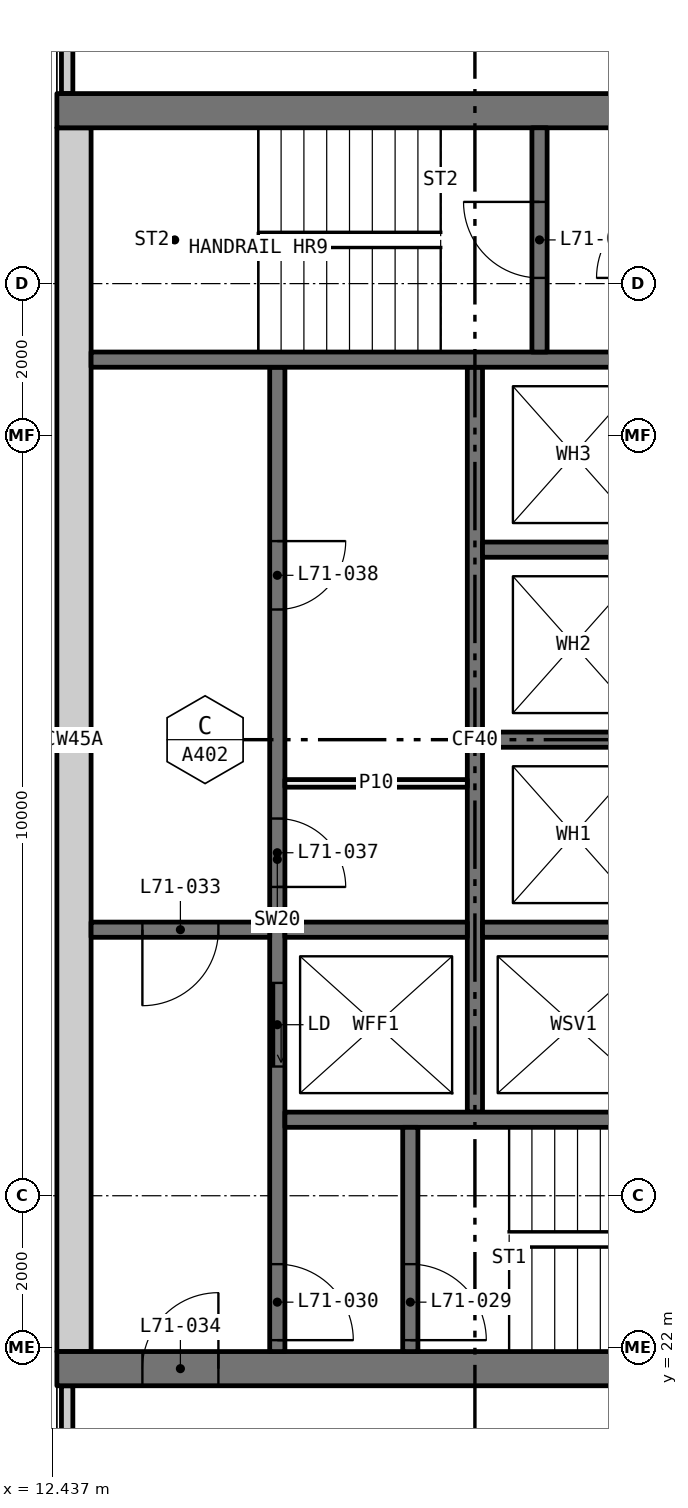
"""IFC4 building model, lengths in metres.
Left out: names, types, materials, properties, quantities, classifications, styles, units other than length and angle.
Written with IfcOpenShell. Run it as: python <this file> out.ifc"""

import sys

from ifc_helpers import new_model, si_unit, direction, frame, frame_2d, origin, place, context, subcontext, project, spatial, rectangle, extrude, element, fill, save


model = new_model("IFC4")
c1 = context("Model", 3, precision=1e-05, world=origin(), true_north=direction((0.0, 1.0)))
c2 = subcontext(c1, "Body", "Model", "MODEL_VIEW")
j1 = project(units=[si_unit("LENGTHUNIT", "METRE"), si_unit("PLANEANGLEUNIT", "RADIAN")], contexts=[c1])
p1 = place(None, origin())
s1 = spatial("IfcSite", under=j1, at=p1, CompositionType="ELEMENT")
p2 = place(p1, origin())
s2 = spatial("IfcBuilding", under=s1, at=p2, CompositionType="ELEMENT")
p3 = place(p2, frame((0.0, 0.0, 262.8)))
s3 = spatial("IfcBuildingStorey", under=s2, at=p3, CompositionType="ELEMENT", Elevation=262.8)
for number, where, z_axis, x_axis in (
    (1, (12.635, 18.71, 0.0), (0.0, 0.0, 1.0), (0.0, 1.0, 0.0)),
    (2, (12.635, 38.5, 0.0), (0.0, 0.0, 1.0), (0.0, 1.0, 0.0)),
):
    element("IfcWall", number, at=place(p3, frame(where, z_axis=z_axis, x_axis=x_axis)), inside=s3, PredefinedType="ELEMENTEDWALL", context=c2, shape_type="SweptSolid", body=[
        extrude(rectangle(XDim=2.79, YDim=0.15, at=frame_2d((1.395, 0.0))), origin(), (0.0, 0.0, 1.0), 3.05),
    ])
p4 = place(p3, frame((12.5, 21.725, 0.0), z_axis=(0.0, 0.0, 1.0), x_axis=(1.0, 0.0, 0.0)))
e3 = element("IfcWall", 3, at=p4, inside=s3, PredefinedType="SHEAR", context=c2, shape_type="SweptSolid", body=[
    extrude(rectangle(XDim=11.0, YDim=0.45, at=frame_2d((5.5, 0.0))), origin(), (0.0, 0.0, 1.0), 3.05),
])
p5 = place(p4, frame((1.125, 0.0, 0.0)))
e4 = element("IfcOpeningElement", 4, at=p5, cuts=e3, PredefinedType="OPENING", context=c2, shape_type="SweptSolid", body=[
    extrude(rectangle(XDim=1.0, YDim=2.1, at=frame_2d((0.5, 1.05))), frame((0.0, 0.235, 0.0), z_axis=(0.0, -1.0, 0.0), x_axis=(1.0, 0.0, 0.0)), (0.0, 0.0, 1.0), 0.47),
])
p6 = place(p3, frame((12.5, 38.275, 0.0), z_axis=(0.0, 0.0, 1.0), x_axis=(1.0, 0.0, 0.0)))
e5 = element("IfcWall", 5, at=p6, inside=s3, PredefinedType="SHEAR", context=c2, shape_type="SweptSolid", body=[
    extrude(rectangle(XDim=11.0, YDim=0.45, at=frame_2d((5.5, 0.0))), origin(), (0.0, 0.0, 1.0), 3.05),
])
p7 = place(p6, frame((8.575, 0.0, 0.0)))
e6 = element("IfcOpeningElement", 6, at=p7, cuts=e5, PredefinedType="OPENING", context=c2, shape_type="SweptSolid", body=[
    extrude(rectangle(XDim=1.6, YDim=2.1, at=frame_2d((0.8, 1.05))), frame((0.0, 0.235, 0.0), z_axis=(0.0, -1.0, 0.0), x_axis=(1.0, 0.0, 0.0)), (0.0, 0.0, 1.0), 0.47),
])
p8 = place(p3, frame((12.725, 21.95, 0.0), z_axis=(0.0, 0.0, 1.0), x_axis=(0.0, 1.0, 0.0)))
e7 = element("IfcWall", 7, at=p8, inside=s3, PredefinedType="SHEAR", context=c2, shape_type="SweptSolid", body=[
    extrude(rectangle(XDim=16.1, YDim=0.45, at=frame_2d((8.05, 0.0))), origin(), (0.0, 0.0, 1.0), 3.05),
])
p9 = place(p3, frame((15.4, 21.95, 0.0), z_axis=(0.0, 0.0, 1.0), x_axis=(0.0, 1.0, 0.0)))
e8 = element("IfcWall", 8, at=p9, inside=s3, PredefinedType="SOLIDWALL", context=c2, shape_type="SweptSolid", body=[
    extrude(rectangle(XDim=12.95, YDim=0.2, at=frame_2d((6.475, 0.0))), origin(), (0.0, 0.0, 1.0), 3.05),
])
p10 = place(p9, frame((3.75, 0.0, 0.0)))
e9 = element("IfcOpeningElement", 9, at=p10, cuts=e8, PredefinedType="OPENING", context=c2, shape_type="SweptSolid", body=[
    extrude(rectangle(XDim=1.1, YDim=2.1, at=frame_2d((0.55, 1.05))), frame((0.0, 0.11, 0.0), z_axis=(0.0, -1.0, 0.0), x_axis=(1.0, 0.0, 0.0)), (0.0, 0.0, 1.0), 0.22),
])
p11 = place(p9, frame((0.15, 0.0, 0.0)))
e10 = element("IfcOpeningElement", 10, at=p11, cuts=e8, PredefinedType="OPENING", context=c2, shape_type="SweptSolid", body=[
    extrude(rectangle(XDim=1.0, YDim=2.1, at=frame_2d((0.5, 1.05))), frame((0.0, 0.11, 0.0), z_axis=(0.0, -1.0, 0.0), x_axis=(1.0, 0.0, 0.0)), (0.0, 0.0, 1.0), 0.22),
])
p12 = place(p9, frame((6.113, 0.0, 0.0)))
e11 = element("IfcOpeningElement", 11, at=p12, cuts=e8, PredefinedType="OPENING", context=c2, shape_type="SweptSolid", body=[
    extrude(rectangle(XDim=0.9, YDim=2.1, at=frame_2d((0.45, 1.05))), frame((0.0, 0.11, 0.0), z_axis=(0.0, -1.0, 0.0), x_axis=(1.0, 0.0, 0.0)), (0.0, 0.0, 1.0), 0.22),
])
p13 = place(p9, frame((9.762, 0.0, 0.0)))
e12 = element("IfcOpeningElement", 12, at=p13, cuts=e8, PredefinedType="OPENING", context=c2, shape_type="SweptSolid", body=[
    extrude(rectangle(XDim=0.9, YDim=2.1, at=frame_2d((0.45, 1.05))), frame((0.0, 0.11, 0.0), z_axis=(0.0, -1.0, 0.0), x_axis=(1.0, 0.0, 0.0)), (0.0, 0.0, 1.0), 0.22),
])
p14 = place(p3, frame((18.0, 25.1, 0.0), z_axis=(0.0, 0.0, 1.0), x_axis=(0.0, 1.0, 0.0)))
e13 = element("IfcWall", 13, at=p14, inside=s3, PredefinedType="SOLIDWALL", context=c2, shape_type="SweptSolid", body=[
    extrude(rectangle(XDim=9.8, YDim=0.2, at=frame_2d((4.9, 0.0))), origin(), (0.0, 0.0, 1.0), 3.05),
])
for number, where, z_axis, x_axis in (
    (14, (15.5, 25.0, 0.0), (0.0, 0.0, 1.0), (1.0, 0.0, 0.0)),
    (15, (12.95, 35.0, 0.0), (0.0, 0.0, 1.0), (1.0, 0.0, 0.0)),
):
    element("IfcWall", number, at=place(p3, frame(where, z_axis=z_axis, x_axis=x_axis)), inside=s3, PredefinedType="SOLIDWALL", context=c2, shape_type="SweptSolid", body=[
        extrude(rectangle(XDim=7.55, YDim=0.2, at=frame_2d((3.775, 0.0))), origin(), (0.0, 0.0, 1.0), 3.05),
    ])
p15 = place(p3, frame((12.95, 27.5, 0.0), z_axis=(0.0, 0.0, 1.0), x_axis=(1.0, 0.0, 0.0)))
e16 = element("IfcWall", 16, at=p15, inside=s3, PredefinedType="SOLIDWALL", context=c2, shape_type="SweptSolid", body=[
    extrude(rectangle(XDim=2.35, YDim=0.2, at=frame_2d((1.175, 0.0))), origin(), (0.0, 0.0, 1.0), 3.05),
])
p16 = place(p15, frame((0.675, 0.0, 0.0)))
e17 = element("IfcOpeningElement", 17, at=p16, cuts=e16, PredefinedType="OPENING", context=c2, shape_type="SweptSolid", body=[
    extrude(rectangle(XDim=1.0, YDim=2.1, at=frame_2d((0.5, 1.05))), frame((0.0, 0.11, 0.0), z_axis=(0.0, -1.0, 0.0), x_axis=(1.0, 0.0, 0.0)), (0.0, 0.0, 1.0), 0.22),
])
p17 = place(p3, frame((17.15, 21.95, 0.0), z_axis=(0.0, 0.0, 1.0), x_axis=(0.0, 1.0, 0.0)))
e18 = element("IfcWall", 18, at=p17, inside=s3, PredefinedType="SOLIDWALL", context=c2, shape_type="SweptSolid", body=[
    extrude(rectangle(XDim=2.95, YDim=0.2, at=frame_2d((1.475, 0.0))), origin(), (0.0, 0.0, 1.0), 3.05),
])
p18 = place(p17, frame((0.15, 0.0, 0.0)))
e19 = element("IfcOpeningElement", 19, at=p18, cuts=e18, PredefinedType="OPENING", context=c2, shape_type="SweptSolid", body=[
    extrude(rectangle(XDim=1.0, YDim=2.1, at=frame_2d((0.5, 1.05))), frame((0.0, 0.11, 0.0), z_axis=(0.0, -1.0, 0.0), x_axis=(1.0, 0.0, 0.0)), (0.0, 0.0, 1.0), 0.22),
])
p19 = place(p3, frame((18.85, 35.1, 0.0), z_axis=(0.0, 0.0, 1.0), x_axis=(0.0, 1.0, 0.0)))
e20 = element("IfcWall", 20, at=p19, inside=s3, PredefinedType="SOLIDWALL", context=c2, shape_type="SweptSolid", body=[
    extrude(rectangle(XDim=2.95, YDim=0.2, at=frame_2d((1.475, 0.0))), origin(), (0.0, 0.0, 1.0), 3.05),
])
p20 = place(p19, frame((0.975, 0.0, 0.0)))
e21 = element("IfcOpeningElement", 21, at=p20, cuts=e20, PredefinedType="OPENING", context=c2, shape_type="SweptSolid", body=[
    extrude(rectangle(XDim=1.0, YDim=2.1, at=frame_2d((0.5, 1.05))), frame((0.0, 0.11, 0.0), z_axis=(0.0, -1.0, 0.0), x_axis=(1.0, 0.0, 0.0)), (0.0, 0.0, 1.0), 0.22),
])
for number, where, z_axis, x_axis in (
    (22, (15.5, 27.5, 0.0), (0.0, 0.0, 1.0), (1.0, 0.0, 0.0)),
    (23, (18.1, 27.5, 0.0), (0.0, 0.0, 1.0), (1.0, 0.0, 0.0)),
    (24, (18.1, 30.0, 0.0), (0.0, 0.0, 1.0), (1.0, 0.0, 0.0)),
    (25, (18.1, 32.5, 0.0), (0.0, 0.0, 1.0), (1.0, 0.0, 0.0)),
):
    element("IfcWall", number, at=place(p3, frame(where, z_axis=z_axis, x_axis=x_axis)), inside=s3, PredefinedType="SOLIDWALL", context=c2, shape_type="SweptSolid", body=[
        extrude(rectangle(XDim=2.4, YDim=0.2, at=frame_2d((1.2, 0.0))), origin(), (0.0, 0.0, 1.0), 3.05),
    ])
p21 = place(p3, frame((15.5, 29.425, 0.0), z_axis=(0.0, 0.0, 1.0), x_axis=(1.0, 0.0, 0.0)))
e26 = element("IfcWall", 26, at=p21, inside=s3, PredefinedType="PARTITIONING", context=c2, shape_type="SweptSolid", body=[
    extrude(rectangle(XDim=2.4, YDim=0.1, at=frame_2d((1.2, 0.0))), origin(), (0.0, 0.0, 1.0), 3.05),
])
p22 = place(p10, origin())
e27 = element("IfcDoor", 27, at=p22, inside=s3, OperationType="SLIDING_TO_LEFT", PredefinedType="DOOR", context=c2, shape_type="SweptSolid", body=[
    extrude(rectangle(XDim=1.1, YDim=2.1, at=frame_2d((0.55, 1.05))), frame((0.0, 0.025, 0.0), z_axis=(0.0, -1.0, 0.0), x_axis=(1.0, 0.0, 0.0)), (0.0, 0.0, 1.0), 0.05),
])
fill(e9, e27)
p23 = place(p18, frame((1.0, 0.0, 0.0), x_axis=(-1.0, 0.0, 0.0)))
e28 = element("IfcDoor", 28, at=p23, inside=s3, OperationType="SINGLE_SWING_LEFT", PredefinedType="DOOR", context=c2, shape_type="SweptSolid", body=[
    extrude(rectangle(XDim=1.0, YDim=2.1, at=frame_2d((0.5, 1.05))), frame((0.0, 0.025, 0.0), z_axis=(0.0, -1.0, 0.0), x_axis=(1.0, 0.0, 0.0)), (0.0, 0.0, 1.0), 0.05),
])
fill(e19, e28)
p24 = place(p11, frame((1.0, 0.0, 0.0), x_axis=(-1.0, 0.0, 0.0)))
e29 = element("IfcDoor", 29, at=p24, inside=s3, OperationType="SINGLE_SWING_LEFT", PredefinedType="DOOR", context=c2, shape_type="SweptSolid", body=[
    extrude(rectangle(XDim=1.0, YDim=2.1, at=frame_2d((0.5, 1.05))), frame((0.0, 0.025, 0.0), z_axis=(0.0, -1.0, 0.0), x_axis=(1.0, 0.0, 0.0)), (0.0, 0.0, 1.0), 0.05),
])
fill(e10, e29)
p25 = place(p20, origin())
e30 = element("IfcDoor", 30, at=p25, inside=s3, OperationType="SINGLE_SWING_LEFT", PredefinedType="DOOR", context=c2, shape_type="SweptSolid", body=[
    extrude(rectangle(XDim=1.0, YDim=2.1, at=frame_2d((0.5, 1.05))), frame((0.0, 0.025, 0.0), z_axis=(0.0, -1.0, 0.0), x_axis=(1.0, 0.0, 0.0)), (0.0, 0.0, 1.0), 0.05),
])
fill(e21, e30)
p26 = place(p16, frame((1.0, 0.0, 0.0), x_axis=(-1.0, 0.0, 0.0)))
e31 = element("IfcDoor", 31, at=p26, inside=s3, OperationType="SINGLE_SWING_LEFT", PredefinedType="DOOR", context=c2, shape_type="SweptSolid", body=[
    extrude(rectangle(XDim=1.0, YDim=2.1, at=frame_2d((0.5, 1.05))), frame((0.0, 0.025, 0.0), z_axis=(0.0, -1.0, 0.0), x_axis=(1.0, 0.0, 0.0)), (0.0, 0.0, 1.0), 0.05),
])
fill(e17, e31)
p27 = place(p5, origin())
e32 = element("IfcDoor", 32, at=p27, inside=s3, OperationType="SINGLE_SWING_LEFT", PredefinedType="DOOR", context=c2, shape_type="SweptSolid", body=[
    extrude(rectangle(XDim=1.0, YDim=2.1, at=frame_2d((0.5, 1.05))), frame((0.0, 0.025, 0.0), z_axis=(0.0, -1.0, 0.0), x_axis=(1.0, 0.0, 0.0)), (0.0, 0.0, 1.0), 0.05),
])
fill(e4, e32)
p28 = place(p12, frame((0.9, 0.0, 0.0), x_axis=(-1.0, 0.0, 0.0)))
e33 = element("IfcDoor", 33, at=p28, inside=s3, OperationType="SINGLE_SWING_LEFT", PredefinedType="DOOR", context=c2, shape_type="SweptSolid", body=[
    extrude(rectangle(XDim=0.9, YDim=2.1, at=frame_2d((0.45, 1.05))), frame((0.0, 0.025, 0.0), z_axis=(0.0, -1.0, 0.0), x_axis=(1.0, 0.0, 0.0)), (0.0, 0.0, 1.0), 0.05),
])
fill(e11, e33)
p29 = place(p13, frame((0.9, 0.0, 0.0), x_axis=(-1.0, 0.0, 0.0)))
e34 = element("IfcDoor", 34, at=p29, inside=s3, OperationType="SINGLE_SWING_RIGHT", PredefinedType="DOOR", context=c2, shape_type="SweptSolid", body=[
    extrude(rectangle(XDim=0.9, YDim=2.1, at=frame_2d((0.45, 1.05))), frame((0.0, 0.025, 0.0), z_axis=(0.0, -1.0, 0.0), x_axis=(1.0, 0.0, 0.0)), (0.0, 0.0, 1.0), 0.05),
])
fill(e12, e34)
save(model, sys.argv[1])
